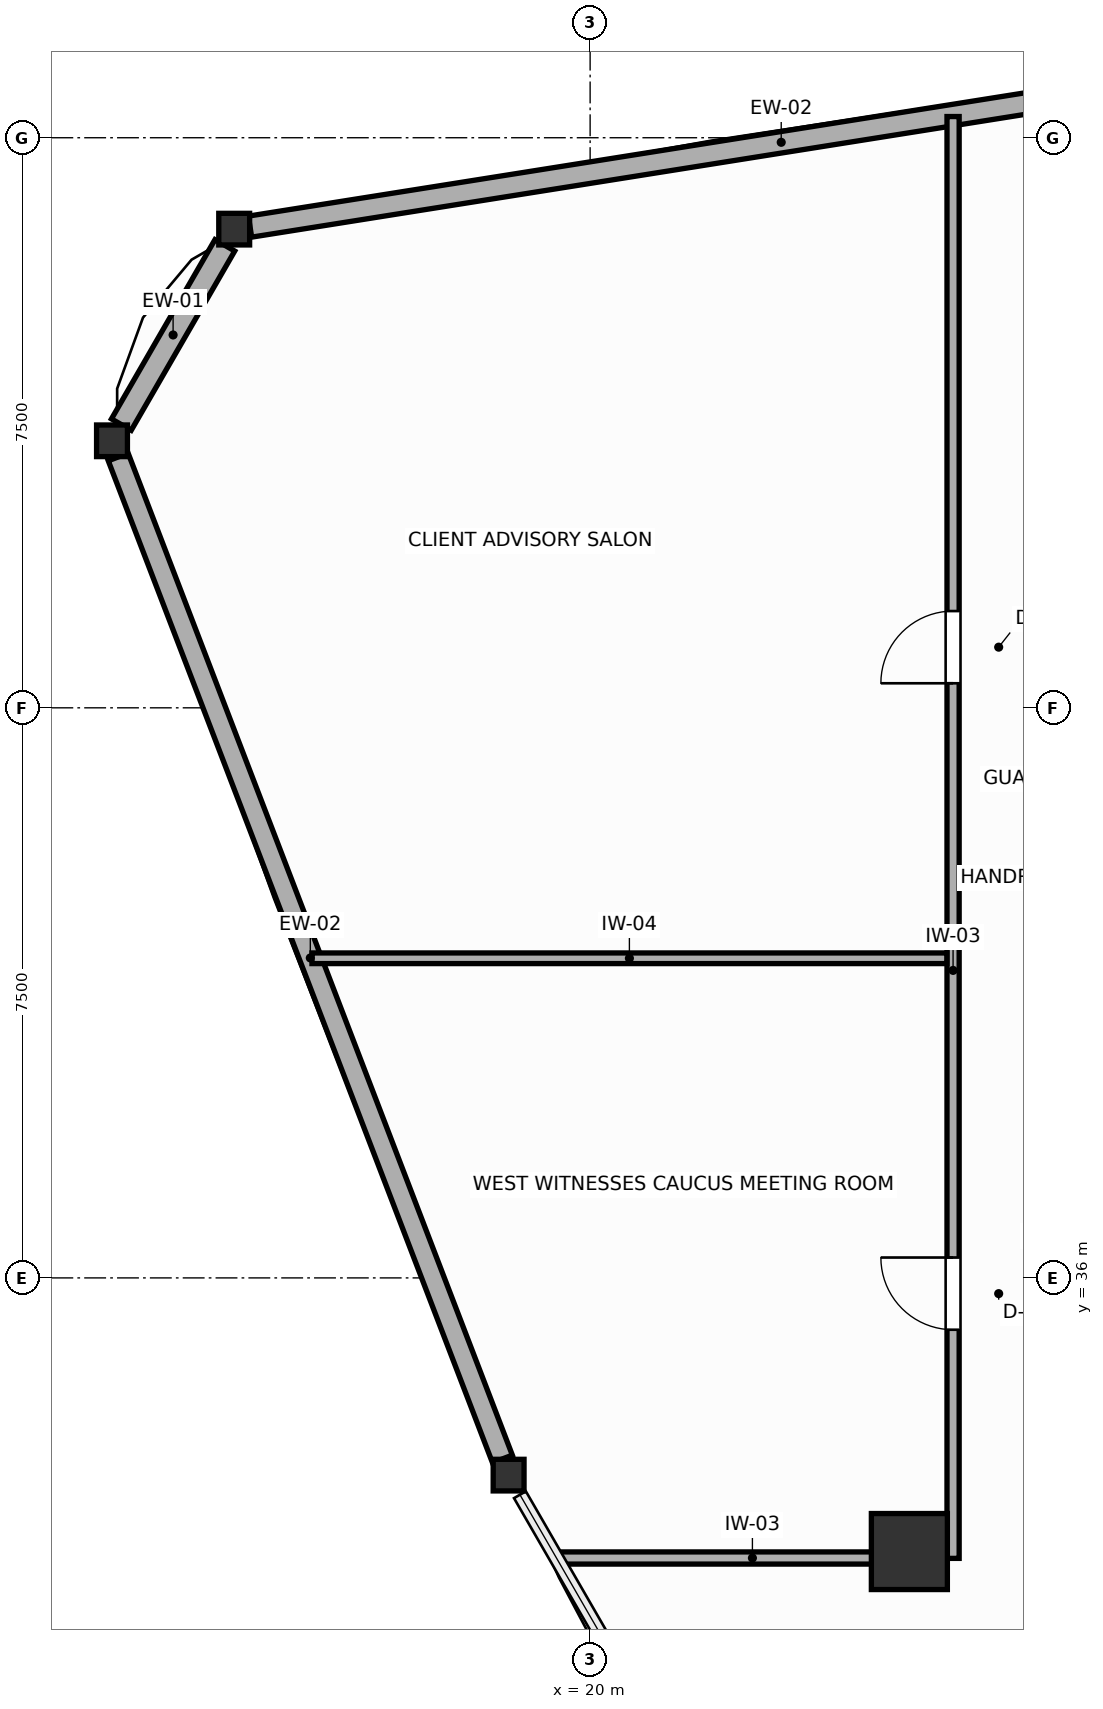
"""IFC4 building model, lengths in metres.
Left out: names, types, materials, properties, quantities, classifications, styles, units other than length and angle.
Written with IfcOpenShell. Run it as: python <this file> out.ifc"""

import sys

from ifc_helpers import new_model, si_unit, direction, frame, frame_2d, origin, origin_2d, place, context, subcontext, project, spatial, rectangle, i_section, extrude, source, transform, mapped, element, fill, save


model = new_model("IFC4")
c1 = context("Model", 3, precision=1e-05, world=origin(), true_north=direction((0.0, 1.0)))
c2 = subcontext(c1, "Body", "Model", "MODEL_VIEW")
j1 = project(units=[si_unit("LENGTHUNIT", "METRE"), si_unit("PLANEANGLEUNIT", "RADIAN")], contexts=[c1])
p1 = place(None, origin())
s1 = spatial("IfcSite", under=j1, at=p1, CompositionType="ELEMENT")
p2 = place(p1, origin())
s2 = spatial("IfcBuilding", under=s1, at=p2, CompositionType="ELEMENT")
p3 = place(p2, frame((0.0, 0.0, 179.4)))
s3 = spatial("IfcBuildingStorey", under=s2, at=p3, CompositionType="ELEMENT", Elevation=179.4)
m1 = source(origin(), c2, "Body", "SweptSolid", [
    extrude(rectangle(XDim=1.0, YDim=1.0, at=origin_2d()), origin(), (0.0, 0.0, 1.0), 3.6),
])
p4 = place(p3, frame((24.2, 32.4, 0.0), z_axis=(0.0, 0.0, 1.0), x_axis=(1.0, 0.0, 0.0)))
e1 = element("IfcColumn", 1, at=p4, inside=s3, PredefinedType="COLUMN", context=c2, shape_type="MappedRepresentation", body=[
    mapped(m1, transform((0.0, 0.0, 0.0), scale=1.0)),
])
m2 = source(origin(), c2, "Body", "SweptSolid", [
    extrude(i_section(OverallWidth=0.406, OverallDepth=0.416, WebThickness=0.027, FlangeThickness=0.044, FilletRadius=0.015, at=origin_2d()), origin(), (0.0, 0.0, 1.0), 3.6),
])
for number, where, z_axis, x_axis in (
    (2, (15.317, 49.798, 0.0), (0.0, 0.0, 1.0), (1.0, 0.0, 0.0)),
    (3, (13.71, 47.013, 0.0), (0.0, 0.0, 1.0), (1.0, 0.0, 0.0)),
    (4, (18.927, 33.406, 0.0), (0.0, 0.0, 1.0), (1.0, 0.0, 0.0)),
):
    element("IfcColumn", number, at=place(p3, frame(where, z_axis=z_axis, x_axis=x_axis)), inside=s3, PredefinedType="COLUMN", context=c2, shape_type="MappedRepresentation", body=[
        mapped(m2, transform((0.0, 0.0, 0.0), scale=1.0)),
    ])
p5 = place(p3, frame((29.503, 52.049, 0.0), z_axis=(0.0, 0.0, 1.0), x_axis=(-0.987634086957, -0.156776625426, 0.0)))
e5 = element("IfcWall", 5, at=p5, inside=s3, PredefinedType="SOLIDWALL", context=c2, shape_type="SweptSolid", body=[
    extrude(rectangle(XDim=14.152, YDim=0.28, at=frame_2d((7.076, 0.0))), origin(), (0.0, 0.0, 1.0), 1.87),
])
p6 = place(p3, frame((15.194, 49.584, 0.0), z_axis=(0.0, 0.0, 1.0), x_axis=(-0.499947493121, -0.866055716523, 0.0)))
e6 = element("IfcWall", 6, at=p6, inside=s3, PredefinedType="SOLIDWALL", context=c2, shape_type="SweptSolid", body=[
    extrude(rectangle(XDim=2.723, YDim=0.3, at=frame_2d((1.362, 0.0))), origin(), (0.0, 0.0, 1.0), 1.87),
])
p7 = place(p3, frame((13.792, 46.8, 0.0), z_axis=(0.0, 0.0, 1.0), x_axis=(0.358033263681, -0.933708831541, 0.0)))
e7 = element("IfcWall", 7, at=p7, inside=s3, PredefinedType="SOLIDWALL", context=c2, shape_type="SweptSolid", body=[
    extrude(rectangle(XDim=14.117, YDim=0.28, at=frame_2d((7.059, 0.0))), origin(), (0.0, 0.0, 1.0), 1.87),
])
p8 = place(p3, frame((24.775, 32.31, 0.0), z_axis=(0.0, 0.0, 1.0), x_axis=(0.0, 1.0, 0.0)))
e8 = element("IfcWall", 8, at=p8, inside=s3, PredefinedType="PARTITIONING", context=c2, shape_type="SweptSolid", body=[
    extrude(rectangle(XDim=18.969, YDim=0.16, at=frame_2d((9.484, 0.0))), origin(), (0.0, 0.0, 1.0), 3.4),
])
p9 = place(p8, frame((3.008, 0.0, 0.0)))
e9 = element("IfcOpeningElement", 9, at=p9, cuts=e8, PredefinedType="OPENING", context=c2, shape_type="SweptSolid", body=[
    extrude(rectangle(XDim=0.95, YDim=2.05, at=frame_2d((0.475, 1.025))), frame((0.0, 0.09, 0.0), z_axis=(0.0, -1.0, 0.0), x_axis=(1.0, 0.0, 0.0)), (0.0, 0.0, 1.0), 0.18),
])
p10 = place(p8, frame((11.513, 0.0, 0.0)))
e10 = element("IfcOpeningElement", 10, at=p10, cuts=e8, PredefinedType="OPENING", context=c2, shape_type="SweptSolid", body=[
    extrude(rectangle(XDim=0.95, YDim=2.05, at=frame_2d((0.475, 1.025))), frame((0.0, 0.09, 0.0), z_axis=(0.0, -1.0, 0.0), x_axis=(1.0, 0.0, 0.0)), (0.0, 0.0, 1.0), 0.18),
])
p11 = place(p3, frame((19.577, 32.315, 0.0), z_axis=(0.0, 0.0, 1.0), x_axis=(1.0, 0.0, 0.0)))
e11 = element("IfcWall", 11, at=p11, inside=s3, PredefinedType="PARTITIONING", context=c2, shape_type="SweptSolid", body=[
    extrude(rectangle(XDim=5.116, YDim=0.16, at=frame_2d((2.558, 0.0))), origin(), (0.0, 0.0, 1.0), 2.16),
])
p12 = place(p3, frame((16.34, 40.205, 0.0), z_axis=(0.0, 0.0, 1.0), x_axis=(1.0, 0.0, 0.0)))
e12 = element("IfcWall", 12, at=p12, inside=s3, PredefinedType="PARTITIONING", context=c2, shape_type="SweptSolid", body=[
    extrude(rectangle(XDim=8.353, YDim=0.14, at=frame_2d((4.176, 0.0))), origin(), (0.0, 0.0, 1.0), 3.4),
])
p13 = place(p9, origin())
e13 = element("IfcDoor", 13, at=p13, inside=s3, OperationType="SINGLE_SWING_RIGHT", PredefinedType="DOOR", context=c2, shape_type="SweptSolid", body=[
    extrude(rectangle(XDim=0.95, YDim=2.05, at=frame_2d((0.475, 1.025))), frame((0.0, 0.025, 0.0), z_axis=(0.0, -1.0, 0.0), x_axis=(1.0, 0.0, 0.0)), (0.0, 0.0, 1.0), 0.05),
])
fill(e9, e13)
p14 = place(p10, origin())
e14 = element("IfcDoor", 14, at=p14, inside=s3, OperationType="SINGLE_SWING_LEFT", PredefinedType="DOOR", context=c2, shape_type="SweptSolid", body=[
    extrude(rectangle(XDim=0.95, YDim=2.05, at=frame_2d((0.475, 1.025))), frame((0.0, 0.025, 0.0), z_axis=(0.0, -1.0, 0.0), x_axis=(1.0, 0.0, 0.0)), (0.0, 0.0, 1.0), 0.05),
])
fill(e10, e14)
save(model, sys.argv[1])
